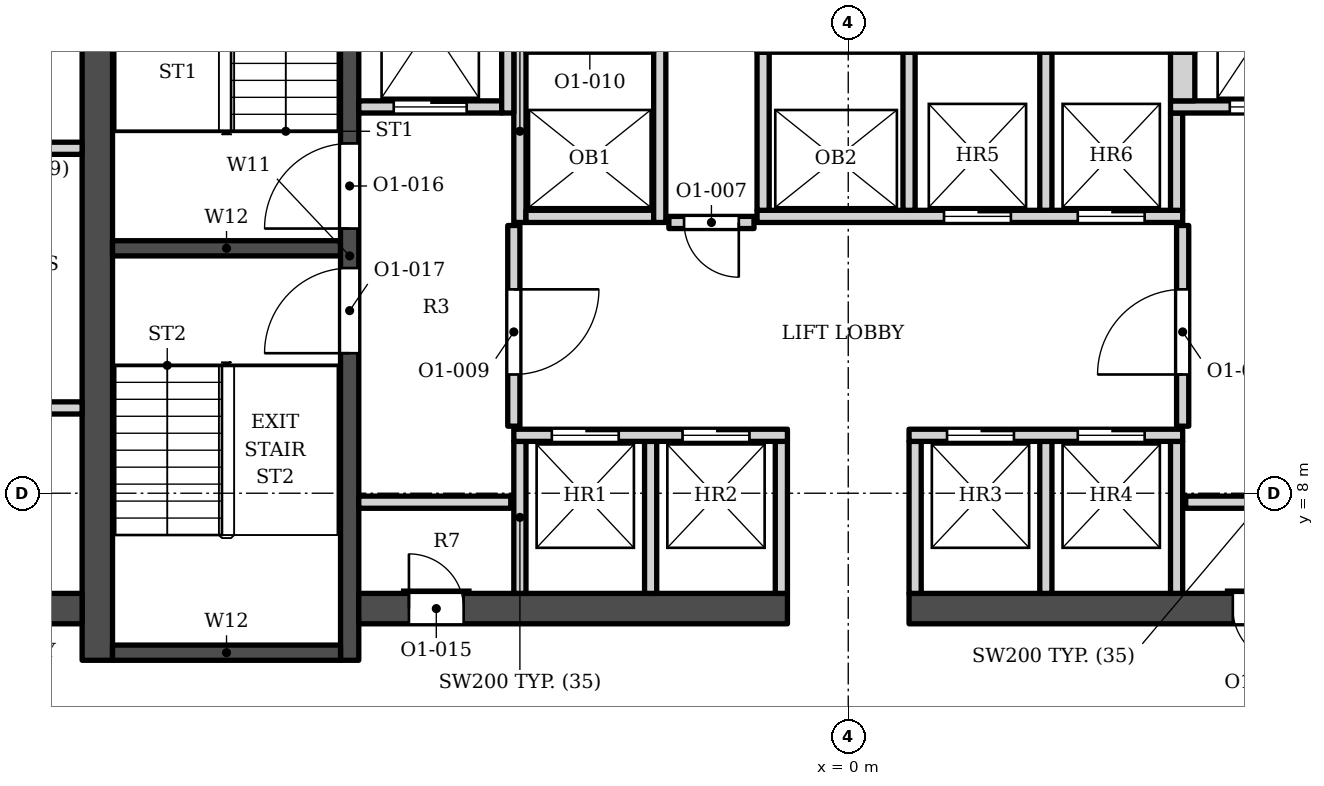
"""IFC4 building model, lengths in metres.
Left out: names, types, materials, properties, quantities, classifications, styles, units other than length and angle.
Written with IfcOpenShell. Run it as: python <this file> out.ifc"""

import sys

from ifc_helpers import new_model, si_unit, direction, frame, frame_2d, origin, place, context, subcontext, project, spatial, rectangle, extrude, element, fill, save


model = new_model("IFC4")
c1 = context("Model", 3, precision=1e-05, world=origin(), true_north=direction((0.0, 1.0)))
c2 = subcontext(c1, "Body", "Model", "MODEL_VIEW")
j1 = project(units=[si_unit("LENGTHUNIT", "METRE"), si_unit("PLANEANGLEUNIT", "RADIAN")], contexts=[c1])
p1 = place(None, origin())
s1 = spatial("IfcSite", under=j1, at=p1, CompositionType="ELEMENT")
p2 = place(p1, origin())
s2 = spatial("IfcBuilding", under=s1, at=p2, CompositionType="ELEMENT")
p3 = place(p2, frame((0.0, 0.0, 144.6)))
s3 = spatial("IfcBuildingStorey", under=s2, at=p3, CompositionType="ELEMENT", Elevation=144.6)
p4 = place(p3, frame((-12.35, 5.253, 0.0), z_axis=(0.0, 0.0, 1.0), x_axis=(0.0, 1.0, 0.0)))
e1 = element("IfcWall", 1, at=p4, inside=s3, PredefinedType="SHEAR", context=c2, shape_type="SweptSolid", body=[
    extrude(rectangle(XDim=13.3, YDim=0.5, at=frame_2d((6.65, 0.0))), origin(), (0.0, 0.0, 1.0), 3.9),
])
p5 = place(p3, frame((-8.2, 5.253, 0.0), z_axis=(0.0, 0.0, 1.0), x_axis=(0.0, 1.0, 0.0)))
e2 = element("IfcWall", 2, at=p5, inside=s3, PredefinedType="SHEAR", context=c2, shape_type="SweptSolid", body=[
    extrude(rectangle(XDim=13.3, YDim=0.3, at=frame_2d((6.65, 0.0))), origin(), (0.0, 0.0, 1.0), 3.9),
])
p6 = place(p5, frame((7.1, 0.0, 0.0)))
e3 = element("IfcOpeningElement", 3, at=p6, cuts=e2, PredefinedType="OPENING", context=c2, shape_type="SweptSolid", body=[
    extrude(rectangle(XDim=1.4, YDim=2.1, at=frame_2d((0.7, 1.05))), frame((0.0, 0.16, 0.0), z_axis=(0.0, -1.0, 0.0), x_axis=(1.0, 0.0, 0.0)), (0.0, 0.0, 1.0), 0.32),
])
p7 = place(p5, frame((5.05, 0.0, 0.0)))
e4 = element("IfcOpeningElement", 4, at=p7, cuts=e2, PredefinedType="OPENING", context=c2, shape_type="SweptSolid", body=[
    extrude(rectangle(XDim=1.4, YDim=2.1, at=frame_2d((0.7, 1.05))), frame((0.0, 0.16, 0.0), z_axis=(0.0, -1.0, 0.0), x_axis=(1.0, 0.0, 0.0)), (0.0, 0.0, 1.0), 0.32),
])
for number, where, z_axis, x_axis in (
    (5, (-12.1, 12.028, 0.0), (0.0, 0.0, 1.0), (1.0, 0.0, 0.0)),
    (6, (-12.1, 5.378, 0.0), (0.0, 0.0, 1.0), (1.0, 0.0, 0.0)),
):
    element("IfcWall", number, at=place(p3, frame(where, z_axis=z_axis, x_axis=x_axis)), inside=s3, PredefinedType="SHEAR", context=c2, shape_type="SweptSolid", body=[
        extrude(rectangle(XDim=3.75, YDim=0.25, at=frame_2d((1.875, 0.0))), origin(), (0.0, 0.0, 1.0), 3.9),
    ])
p8 = place(p3, frame((-8.05, 6.103, 0.0), z_axis=(0.0, 0.0, 1.0), x_axis=(1.0, 0.0, 0.0)))
e7 = element("IfcWall", 7, at=p8, inside=s3, PredefinedType="SHEAR", context=c2, shape_type="SweptSolid", body=[
    extrude(rectangle(XDim=7.05, YDim=0.5, at=frame_2d((3.525, 0.0))), origin(), (0.0, 0.0, 1.0), 3.9),
])
p9 = place(p8, frame((0.825, 0.0, 0.0)))
e8 = element("IfcOpeningElement", 8, at=p9, cuts=e7, PredefinedType="OPENING", context=c2, shape_type="SweptSolid", body=[
    extrude(rectangle(XDim=0.9, YDim=2.1, at=frame_2d((0.45, 1.05))), frame((0.0, 0.26, 0.0), z_axis=(0.0, -1.0, 0.0), x_axis=(1.0, 0.0, 0.0)), (0.0, 0.0, 1.0), 0.52),
])
p10 = place(p3, frame((1.0, 6.103, 0.0), z_axis=(0.0, 0.0, 1.0), x_axis=(1.0, 0.0, 0.0)))
e9 = element("IfcWall", 9, at=p10, inside=s3, PredefinedType="SHEAR", context=c2, shape_type="SweptSolid", body=[
    extrude(rectangle(XDim=7.05, YDim=0.5, at=frame_2d((3.525, 0.0))), origin(), (0.0, 0.0, 1.0), 3.9),
])
p11 = place(p10, frame((5.325, 0.0, 0.0)))
e10 = element("IfcOpeningElement", 10, at=p11, cuts=e9, PredefinedType="OPENING", context=c2, shape_type="SweptSolid", body=[
    extrude(rectangle(XDim=0.9, YDim=2.1, at=frame_2d((0.45, 1.05))), frame((0.0, 0.26, 0.0), z_axis=(0.0, -1.0, 0.0), x_axis=(1.0, 0.0, 0.0)), (0.0, 0.0, 1.0), 0.52),
])
p12 = place(p3, frame((-12.6, 6.103, 0.0), z_axis=(0.0, 0.0, 1.0), x_axis=(-1.0, 0.0, 0.0)))
e11 = element("IfcWall", 11, at=p12, inside=s3, PredefinedType="SHEAR", context=c2, shape_type="SweptSolid", body=[
    extrude(rectangle(XDim=2.5, YDim=0.5, at=frame_2d((1.25, 0.0))), origin(), (0.0, 0.0, 1.0), 3.9),
])
for number, where, z_axis, x_axis in (
    (12, (-5.4, 6.353, 0.0), (0.0, 0.0, 1.0), (0.0, 1.0, 0.0)),
    (13, (-3.25, 6.353, 0.0), (0.0, 0.0, 1.0), (0.0, 1.0, 0.0)),
    (14, (-1.1, 6.353, 0.0), (0.0, 0.0, 1.0), (0.0, 1.0, 0.0)),
    (15, (1.1, 6.353, 0.0), (0.0, 0.0, 1.0), (0.0, 1.0, 0.0)),
    (16, (3.25, 6.353, 0.0), (0.0, 0.0, 1.0), (0.0, 1.0, 0.0)),
    (17, (5.4, 6.353, 0.0), (0.0, 0.0, 1.0), (0.0, 1.0, 0.0)),
    (18, (-8.05, 7.853, 0.0), (0.0, 0.0, 1.0), (1.0, 0.0, 0.0)),
    (19, (5.55, 7.853, 0.0), (0.0, 0.0, 1.0), (1.0, 0.0, 0.0)),
):
    element("IfcWall", number, at=place(p3, frame(where, z_axis=z_axis, x_axis=x_axis)), inside=s3, PredefinedType="SOLIDWALL", context=c2, shape_type="SweptSolid", body=[
        extrude(rectangle(XDim=2.5, YDim=0.2, at=frame_2d((1.25, 0.0))), origin(), (0.0, 0.0, 1.0), 3.73),
    ])
p13 = place(p3, frame((-5.5, 8.953, 0.0), z_axis=(0.0, 0.0, 1.0), x_axis=(1.0, 0.0, 0.0)))
e20 = element("IfcWall", 20, at=p13, inside=s3, PredefinedType="SOLIDWALL", context=c2, shape_type="SweptSolid", body=[
    extrude(rectangle(XDim=4.5, YDim=0.2, at=frame_2d((2.25, 0.0))), origin(), (0.0, 0.0, 1.0), 3.73),
])
p14 = place(p13, frame((0.625, 0.0, 0.0)))
e21 = element("IfcOpeningElement", 21, at=p14, cuts=e20, PredefinedType="OPENING", context=c2, shape_type="SweptSolid", body=[
    extrude(rectangle(XDim=1.1, YDim=2.1, at=frame_2d((0.55, 1.05))), frame((0.0, 0.11, 0.0), z_axis=(0.0, -1.0, 0.0), x_axis=(1.0, 0.0, 0.0)), (0.0, 0.0, 1.0), 0.22),
])
p15 = place(p13, frame((2.775, 0.0, 0.0)))
e22 = element("IfcOpeningElement", 22, at=p15, cuts=e20, PredefinedType="OPENING", context=c2, shape_type="SweptSolid", body=[
    extrude(rectangle(XDim=1.1, YDim=2.1, at=frame_2d((0.55, 1.05))), frame((0.0, 0.11, 0.0), z_axis=(0.0, -1.0, 0.0), x_axis=(1.0, 0.0, 0.0)), (0.0, 0.0, 1.0), 0.22),
])
p16 = place(p3, frame((1.0, 8.953, 0.0), z_axis=(0.0, 0.0, 1.0), x_axis=(1.0, 0.0, 0.0)))
e23 = element("IfcWall", 23, at=p16, inside=s3, PredefinedType="SOLIDWALL", context=c2, shape_type="SweptSolid", body=[
    extrude(rectangle(XDim=4.5, YDim=0.2, at=frame_2d((2.25, 0.0))), origin(), (0.0, 0.0, 1.0), 3.73),
])
p17 = place(p16, frame((0.625, 0.0, 0.0)))
e24 = element("IfcOpeningElement", 24, at=p17, cuts=e23, PredefinedType="OPENING", context=c2, shape_type="SweptSolid", body=[
    extrude(rectangle(XDim=1.1, YDim=2.1, at=frame_2d((0.55, 1.05))), frame((0.0, 0.11, 0.0), z_axis=(0.0, -1.0, 0.0), x_axis=(1.0, 0.0, 0.0)), (0.0, 0.0, 1.0), 0.22),
])
p18 = place(p16, frame((2.775, 0.0, 0.0)))
e25 = element("IfcOpeningElement", 25, at=p18, cuts=e23, PredefinedType="OPENING", context=c2, shape_type="SweptSolid", body=[
    extrude(rectangle(XDim=1.1, YDim=2.1, at=frame_2d((0.55, 1.05))), frame((0.0, 0.11, 0.0), z_axis=(0.0, -1.0, 0.0), x_axis=(1.0, 0.0, 0.0)), (0.0, 0.0, 1.0), 0.22),
])
p19 = place(p3, frame((-5.5, 9.103, 0.0), z_axis=(0.0, 0.0, 1.0), x_axis=(0.0, 1.0, 0.0)))
e26 = element("IfcWall", 26, at=p19, inside=s3, PredefinedType="SOLIDWALL", context=c2, shape_type="SweptSolid", body=[
    extrude(rectangle(XDim=3.3, YDim=0.2, at=frame_2d((1.65, 0.0))), origin(), (0.0, 0.0, 1.0), 3.73),
])
p20 = place(p19, frame((0.85, 0.0, 0.0)))
e27 = element("IfcOpeningElement", 27, at=p20, cuts=e26, PredefinedType="OPENING", context=c2, shape_type="SweptSolid", body=[
    extrude(rectangle(XDim=1.4, YDim=2.1, at=frame_2d((0.7, 1.05))), frame((0.0, 0.11, 0.0), z_axis=(0.0, -1.0, 0.0), x_axis=(1.0, 0.0, 0.0)), (0.0, 0.0, 1.0), 0.22),
])
p21 = place(p3, frame((5.5, 9.103, 0.0), z_axis=(0.0, 0.0, 1.0), x_axis=(0.0, 1.0, 0.0)))
e28 = element("IfcWall", 28, at=p21, inside=s3, PredefinedType="SOLIDWALL", context=c2, shape_type="SweptSolid", body=[
    extrude(rectangle(XDim=3.3, YDim=0.2, at=frame_2d((1.65, 0.0))), origin(), (0.0, 0.0, 1.0), 3.73),
])
p22 = place(p21, frame((0.85, 0.0, 0.0)))
e29 = element("IfcOpeningElement", 29, at=p22, cuts=e28, PredefinedType="OPENING", context=c2, shape_type="SweptSolid", body=[
    extrude(rectangle(XDim=1.4, YDim=2.1, at=frame_2d((0.7, 1.05))), frame((0.0, 0.11, 0.0), z_axis=(0.0, -1.0, 0.0), x_axis=(1.0, 0.0, 0.0)), (0.0, 0.0, 1.0), 0.22),
])
p23 = place(p3, frame((-15.1, 9.403, 0.0), z_axis=(0.0, 0.0, 1.0), x_axis=(1.0, 0.0, 0.0)))
e30 = element("IfcWall", 30, at=p23, inside=s3, PredefinedType="PARTITIONING", context=c2, shape_type="SweptSolid", body=[
    extrude(rectangle(XDim=2.5, YDim=0.2, at=frame_2d((1.25, 0.0))), origin(), (0.0, 0.0, 1.0), 3.73),
])
p24 = place(p3, frame((-2.95, 12.453, 0.0), z_axis=(0.0, 0.0, 1.0), x_axis=(1.0, 0.0, 0.0)))
e31 = element("IfcWall", 31, at=p24, inside=s3, PredefinedType="SOLIDWALL", context=c2, shape_type="SweptSolid", body=[
    extrude(rectangle(XDim=1.4, YDim=0.2, at=frame_2d((0.7, 0.0))), origin(), (0.0, 0.0, 1.0), 3.73),
])
p25 = place(p24, frame((0.25, 0.0, 0.0)))
e32 = element("IfcOpeningElement", 32, at=p25, cuts=e31, PredefinedType="OPENING", context=c2, shape_type="SweptSolid", body=[
    extrude(rectangle(XDim=0.9, YDim=2.1, at=frame_2d((0.45, 1.05))), frame((0.0, 0.11, 0.0), z_axis=(0.0, -1.0, 0.0), x_axis=(1.0, 0.0, 0.0)), (0.0, 0.0, 1.0), 0.22),
])
p26 = place(p3, frame((-5.4, 12.453, 0.0), z_axis=(0.0, 0.0, 1.0), x_axis=(0.0, 1.0, 0.0)))
e33 = element("IfcWall", 33, at=p26, inside=s3, PredefinedType="SOLIDWALL", context=c2, shape_type="SweptSolid", body=[
    extrude(rectangle(XDim=3.0, YDim=0.2, at=frame_2d((1.5, 0.0))), origin(), (0.0, 0.0, 1.0), 3.73),
])
p27 = place(p3, frame((-5.3, 12.552, 0.0), z_axis=(0.0, 0.0, 1.0), x_axis=(1.0, 0.0, 0.0)))
e34 = element("IfcWall", 34, at=p27, inside=s3, PredefinedType="SOLIDWALL", context=c2, shape_type="SweptSolid", body=[
    extrude(rectangle(XDim=2.1, YDim=0.2, at=frame_2d((1.05, 0.0))), origin(), (0.0, 0.0, 1.0), 3.73),
])
p28 = place(p3, frame((-3.1, 12.453, 0.0), z_axis=(0.0, 0.0, 1.0), x_axis=(0.0, 1.0, 0.0)))
e35 = element("IfcWall", 35, at=p28, inside=s3, PredefinedType="SOLIDWALL", context=c2, shape_type="SweptSolid", body=[
    extrude(rectangle(XDim=3.0, YDim=0.2, at=frame_2d((1.5, 0.0))), origin(), (0.0, 0.0, 1.0), 3.73),
])
p29 = place(p3, frame((-1.5, 12.552, 0.0), z_axis=(0.0, 0.0, 1.0), x_axis=(1.0, 0.0, 0.0)))
e36 = element("IfcWall", 36, at=p29, inside=s3, PredefinedType="SOLIDWALL", context=c2, shape_type="SweptSolid", body=[
    extrude(rectangle(XDim=7.0, YDim=0.2, at=frame_2d((3.5, 0.0))), origin(), (0.0, 0.0, 1.0), 3.73),
])
p30 = place(p29, frame((3.075, 0.0, 0.0)))
e37 = element("IfcOpeningElement", 37, at=p30, cuts=e36, PredefinedType="OPENING", context=c2, shape_type="SweptSolid", body=[
    extrude(rectangle(XDim=1.1, YDim=2.1, at=frame_2d((0.55, 1.05))), frame((0.0, 0.11, 0.0), z_axis=(0.0, -1.0, 0.0), x_axis=(1.0, 0.0, 0.0)), (0.0, 0.0, 1.0), 0.22),
])
p31 = place(p29, frame((5.275, 0.0, 0.0)))
e38 = element("IfcOpeningElement", 38, at=p31, cuts=e36, PredefinedType="OPENING", context=c2, shape_type="SweptSolid", body=[
    extrude(rectangle(XDim=1.1, YDim=2.1, at=frame_2d((0.55, 1.05))), frame((0.0, 0.11, 0.0), z_axis=(0.0, -1.0, 0.0), x_axis=(1.0, 0.0, 0.0)), (0.0, 0.0, 1.0), 0.22),
])
for number, where, z_axis, x_axis in (
    (39, (-1.4, 12.653, 0.0), (0.0, 0.0, 1.0), (0.0, 1.0, 0.0)),
    (40, (1.0, 12.653, 0.0), (0.0, 0.0, 1.0), (0.0, 1.0, 0.0)),
    (41, (3.25, 12.653, 0.0), (0.0, 0.0, 1.0), (0.0, 1.0, 0.0)),
):
    element("IfcWall", number, at=place(p3, frame(where, z_axis=z_axis, x_axis=x_axis)), inside=s3, PredefinedType="SOLIDWALL", context=c2, shape_type="SweptSolid", body=[
        extrude(rectangle(XDim=2.6, YDim=0.2, at=frame_2d((1.3, 0.0))), origin(), (0.0, 0.0, 1.0), 3.73),
    ])
p32 = place(p3, frame((5.4, 12.653, 0.0), z_axis=(0.0, 0.0, 1.0), x_axis=(0.0, 1.0, 0.0)))
e42 = element("IfcWall", 42, at=p32, inside=s3, PredefinedType="SOLIDWALL", context=c2, shape_type="SweptSolid", body=[
    extrude(rectangle(XDim=1.6, YDim=0.2, at=frame_2d((0.8, 0.0))), origin(), (0.0, 0.0, 1.0), 3.73),
])
p33 = place(p3, frame((-15.1, 13.673, 0.0), z_axis=(0.0, 0.0, 1.0), x_axis=(1.0, 0.0, 0.0)))
e43 = element("IfcWall", 43, at=p33, inside=s3, PredefinedType="PARTITIONING", context=c2, shape_type="SweptSolid", body=[
    extrude(rectangle(XDim=2.5, YDim=0.2, at=frame_2d((1.25, 0.0))), origin(), (0.0, 0.0, 1.0), 3.73),
])
p34 = place(p3, frame((-8.05, 14.353, 0.0), z_axis=(0.0, 0.0, 1.0), x_axis=(1.0, 0.0, 0.0)))
e44 = element("IfcWall", 44, at=p34, inside=s3, PredefinedType="SOLIDWALL", context=c2, shape_type="SweptSolid", body=[
    extrude(rectangle(XDim=2.35, YDim=0.2, at=frame_2d((1.175, 0.0))), origin(), (0.0, 0.0, 1.0), 3.73),
])
p35 = place(p34, frame((0.575, 0.0, 0.0)))
e45 = element("IfcOpeningElement", 45, at=p35, cuts=e44, PredefinedType="OPENING", context=c2, shape_type="SweptSolid", body=[
    extrude(rectangle(XDim=1.2, YDim=2.1, at=frame_2d((0.6, 1.05))), frame((0.0, 0.11, 0.0), z_axis=(0.0, -1.0, 0.0), x_axis=(1.0, 0.0, 0.0)), (0.0, 0.0, 1.0), 0.22),
])
p36 = place(p3, frame((-5.6, 14.253, 0.0), z_axis=(0.0, 0.0, 1.0), x_axis=(0.0, 1.0, 0.0)))
e46 = element("IfcWall", 46, at=p36, inside=s3, PredefinedType="SOLIDWALL", context=c2, shape_type="SweptSolid", body=[
    extrude(rectangle(XDim=4.3, YDim=0.2, at=frame_2d((2.15, 0.0))), origin(), (0.0, 0.0, 1.0), 3.73),
])
p37 = place(p3, frame((5.3, 14.353, 0.0), z_axis=(0.0, 0.0, 1.0), x_axis=(1.0, 0.0, 0.0)))
e47 = element("IfcWall", 47, at=p37, inside=s3, PredefinedType="SOLIDWALL", context=c2, shape_type="SweptSolid", body=[
    extrude(rectangle(XDim=2.75, YDim=0.2, at=frame_2d((1.375, 0.0))), origin(), (0.0, 0.0, 1.0), 3.73),
])
p38 = place(p37, frame((0.975, 0.0, 0.0)))
e48 = element("IfcOpeningElement", 48, at=p38, cuts=e47, PredefinedType="OPENING", context=c2, shape_type="SweptSolid", body=[
    extrude(rectangle(XDim=1.2, YDim=2.1, at=frame_2d((0.6, 1.05))), frame((0.0, 0.11, 0.0), z_axis=(0.0, -1.0, 0.0), x_axis=(1.0, 0.0, 0.0)), (0.0, 0.0, 1.0), 0.22),
])
p39 = place(p3, frame((5.5, 14.453, 0.0), z_axis=(0.0, 0.0, 1.0), x_axis=(0.0, 1.0, 0.0)))
e49 = element("IfcWall", 49, at=p39, inside=s3, PredefinedType="SOLIDWALL", context=c2, shape_type="SweptSolid", body=[
    extrude(rectangle(XDim=0.8, YDim=0.4, at=frame_2d((0.4, 0.0))), origin(), (0.0, 0.0, 1.0), 3.73),
])
p40 = place(p3, frame((-5.3, 15.353, 0.0), z_axis=(0.0, 0.0, 1.0), x_axis=(1.0, 0.0, 0.0)))
e50 = element("IfcWall", 50, at=p40, inside=s3, PredefinedType="SOLIDWALL", context=c2, shape_type="SweptSolid", body=[
    extrude(rectangle(XDim=2.1, YDim=0.2, at=frame_2d((1.05, 0.0))), origin(), (0.0, 0.0, 1.0), 3.73),
])
p41 = place(p3, frame((-1.5, 15.353, 0.0), z_axis=(0.0, 0.0, 1.0), x_axis=(1.0, 0.0, 0.0)))
e51 = element("IfcWall", 51, at=p41, inside=s3, PredefinedType="SOLIDWALL", context=c2, shape_type="SweptSolid", body=[
    extrude(rectangle(XDim=7.2, YDim=0.2, at=frame_2d((3.6, 0.0))), origin(), (0.0, 0.0, 1.0), 3.73),
])
p42 = place(p14, origin())
e52 = element("IfcDoor", 52, at=p42, inside=s3, OperationType="DOUBLE_DOOR_SLIDING", PredefinedType="DOOR", context=c2, shape_type="SweptSolid", body=[
    extrude(rectangle(XDim=1.1, YDim=2.1, at=frame_2d((0.55, 1.05))), frame((0.0, 0.025, 0.0), z_axis=(0.0, -1.0, 0.0), x_axis=(1.0, 0.0, 0.0)), (0.0, 0.0, 1.0), 0.05),
])
fill(e21, e52)
p43 = place(p15, origin())
e53 = element("IfcDoor", 53, at=p43, inside=s3, OperationType="DOUBLE_DOOR_SLIDING", PredefinedType="DOOR", context=c2, shape_type="SweptSolid", body=[
    extrude(rectangle(XDim=1.1, YDim=2.1, at=frame_2d((0.55, 1.05))), frame((0.0, 0.025, 0.0), z_axis=(0.0, -1.0, 0.0), x_axis=(1.0, 0.0, 0.0)), (0.0, 0.0, 1.0), 0.05),
])
fill(e22, e53)
p44 = place(p17, origin())
e54 = element("IfcDoor", 54, at=p44, inside=s3, OperationType="DOUBLE_DOOR_SLIDING", PredefinedType="DOOR", context=c2, shape_type="SweptSolid", body=[
    extrude(rectangle(XDim=1.1, YDim=2.1, at=frame_2d((0.55, 1.05))), frame((0.0, 0.025, 0.0), z_axis=(0.0, -1.0, 0.0), x_axis=(1.0, 0.0, 0.0)), (0.0, 0.0, 1.0), 0.05),
])
fill(e24, e54)
p45 = place(p18, origin())
e55 = element("IfcDoor", 55, at=p45, inside=s3, OperationType="DOUBLE_DOOR_SLIDING", PredefinedType="DOOR", context=c2, shape_type="SweptSolid", body=[
    extrude(rectangle(XDim=1.1, YDim=2.1, at=frame_2d((0.55, 1.05))), frame((0.0, 0.025, 0.0), z_axis=(0.0, -1.0, 0.0), x_axis=(1.0, 0.0, 0.0)), (0.0, 0.0, 1.0), 0.05),
])
fill(e25, e55)
p46 = place(p30, origin())
e56 = element("IfcDoor", 56, at=p46, inside=s3, OperationType="DOUBLE_DOOR_SLIDING", PredefinedType="DOOR", context=c2, shape_type="SweptSolid", body=[
    extrude(rectangle(XDim=1.1, YDim=2.1, at=frame_2d((0.55, 1.05))), frame((0.0, 0.025, 0.0), z_axis=(0.0, -1.0, 0.0), x_axis=(1.0, 0.0, 0.0)), (0.0, 0.0, 1.0), 0.05),
])
fill(e37, e56)
p47 = place(p31, origin())
e57 = element("IfcDoor", 57, at=p47, inside=s3, OperationType="DOUBLE_DOOR_SLIDING", PredefinedType="DOOR", context=c2, shape_type="SweptSolid", body=[
    extrude(rectangle(XDim=1.1, YDim=2.1, at=frame_2d((0.55, 1.05))), frame((0.0, 0.025, 0.0), z_axis=(0.0, -1.0, 0.0), x_axis=(1.0, 0.0, 0.0)), (0.0, 0.0, 1.0), 0.05),
])
fill(e38, e57)
p48 = place(p35, origin())
e58 = element("IfcDoor", 58, at=p48, inside=s3, OperationType="DOUBLE_DOOR_SLIDING", PredefinedType="DOOR", context=c2, shape_type="SweptSolid", body=[
    extrude(rectangle(XDim=1.2, YDim=2.1, at=frame_2d((0.6, 1.05))), frame((0.0, 0.025, 0.0), z_axis=(0.0, -1.0, 0.0), x_axis=(1.0, 0.0, 0.0)), (0.0, 0.0, 1.0), 0.05),
])
fill(e45, e58)
p49 = place(p38, origin())
e59 = element("IfcDoor", 59, at=p49, inside=s3, OperationType="DOUBLE_DOOR_SLIDING", PredefinedType="DOOR", context=c2, shape_type="SweptSolid", body=[
    extrude(rectangle(XDim=1.2, YDim=2.1, at=frame_2d((0.6, 1.05))), frame((0.0, 0.025, 0.0), z_axis=(0.0, -1.0, 0.0), x_axis=(1.0, 0.0, 0.0)), (0.0, 0.0, 1.0), 0.05),
])
fill(e48, e59)
p50 = place(p6, origin())
e60 = element("IfcDoor", 60, at=p50, inside=s3, OperationType="SINGLE_SWING_LEFT", PredefinedType="DOOR", context=c2, shape_type="SweptSolid", body=[
    extrude(rectangle(XDim=1.4, YDim=2.1, at=frame_2d((0.7, 1.05))), frame((0.0, 0.025, 0.0), z_axis=(0.0, -1.0, 0.0), x_axis=(1.0, 0.0, 0.0)), (0.0, 0.0, 1.0), 0.05),
])
fill(e3, e60)
p51 = place(p7, origin())
e61 = element("IfcDoor", 61, at=p51, inside=s3, OperationType="SINGLE_SWING_LEFT", PredefinedType="DOOR", context=c2, shape_type="SweptSolid", body=[
    extrude(rectangle(XDim=1.4, YDim=2.1, at=frame_2d((0.7, 1.05))), frame((0.0, 0.025, 0.0), z_axis=(0.0, -1.0, 0.0), x_axis=(1.0, 0.0, 0.0)), (0.0, 0.0, 1.0), 0.05),
])
fill(e4, e61)
p52 = place(p25, origin())
e62 = element("IfcDoor", 62, at=p52, inside=s3, OperationType="SINGLE_SWING_RIGHT", PredefinedType="DOOR", context=c2, shape_type="SweptSolid", body=[
    extrude(rectangle(XDim=0.9, YDim=2.1, at=frame_2d((0.45, 1.05))), frame((0.0, 0.025, 0.0), z_axis=(0.0, -1.0, 0.0), x_axis=(1.0, 0.0, 0.0)), (0.0, 0.0, 1.0), 0.05),
])
fill(e32, e62)
p53 = place(p20, origin())
e63 = element("IfcDoor", 63, at=p53, inside=s3, OperationType="SINGLE_SWING_RIGHT", PredefinedType="DOOR", context=c2, shape_type="SweptSolid", body=[
    extrude(rectangle(XDim=1.4, YDim=2.1, at=frame_2d((0.7, 1.05))), frame((0.0, 0.025, 0.0), z_axis=(0.0, -1.0, 0.0), x_axis=(1.0, 0.0, 0.0)), (0.0, 0.0, 1.0), 0.05),
])
fill(e27, e63)
p54 = place(p22, origin())
e64 = element("IfcDoor", 64, at=p54, inside=s3, OperationType="SINGLE_SWING_LEFT", PredefinedType="DOOR", context=c2, shape_type="SweptSolid", body=[
    extrude(rectangle(XDim=1.4, YDim=2.1, at=frame_2d((0.7, 1.05))), frame((0.0, 0.025, 0.0), z_axis=(0.0, -1.0, 0.0), x_axis=(1.0, 0.0, 0.0)), (0.0, 0.0, 1.0), 0.05),
])
fill(e29, e64)
p55 = place(p9, origin())
e65 = element("IfcDoor", 65, at=p55, inside=s3, OperationType="SINGLE_SWING_LEFT", PredefinedType="DOOR", context=c2, shape_type="SweptSolid", body=[
    extrude(rectangle(XDim=0.9, YDim=2.1, at=frame_2d((0.45, 1.05))), frame((0.0, 0.025, 0.0), z_axis=(0.0, -1.0, 0.0), x_axis=(1.0, 0.0, 0.0)), (0.0, 0.0, 1.0), 0.05),
])
fill(e8, e65)
p56 = place(p11, origin())
e66 = element("IfcDoor", 66, at=p56, inside=s3, OperationType="SINGLE_SWING_RIGHT", PredefinedType="DOOR", context=c2, shape_type="SweptSolid", body=[
    extrude(rectangle(XDim=0.9, YDim=2.1, at=frame_2d((0.45, 1.05))), frame((0.0, 0.025, 0.0), z_axis=(0.0, -1.0, 0.0), x_axis=(1.0, 0.0, 0.0)), (0.0, 0.0, 1.0), 0.05),
])
fill(e10, e66)
save(model, sys.argv[1])
